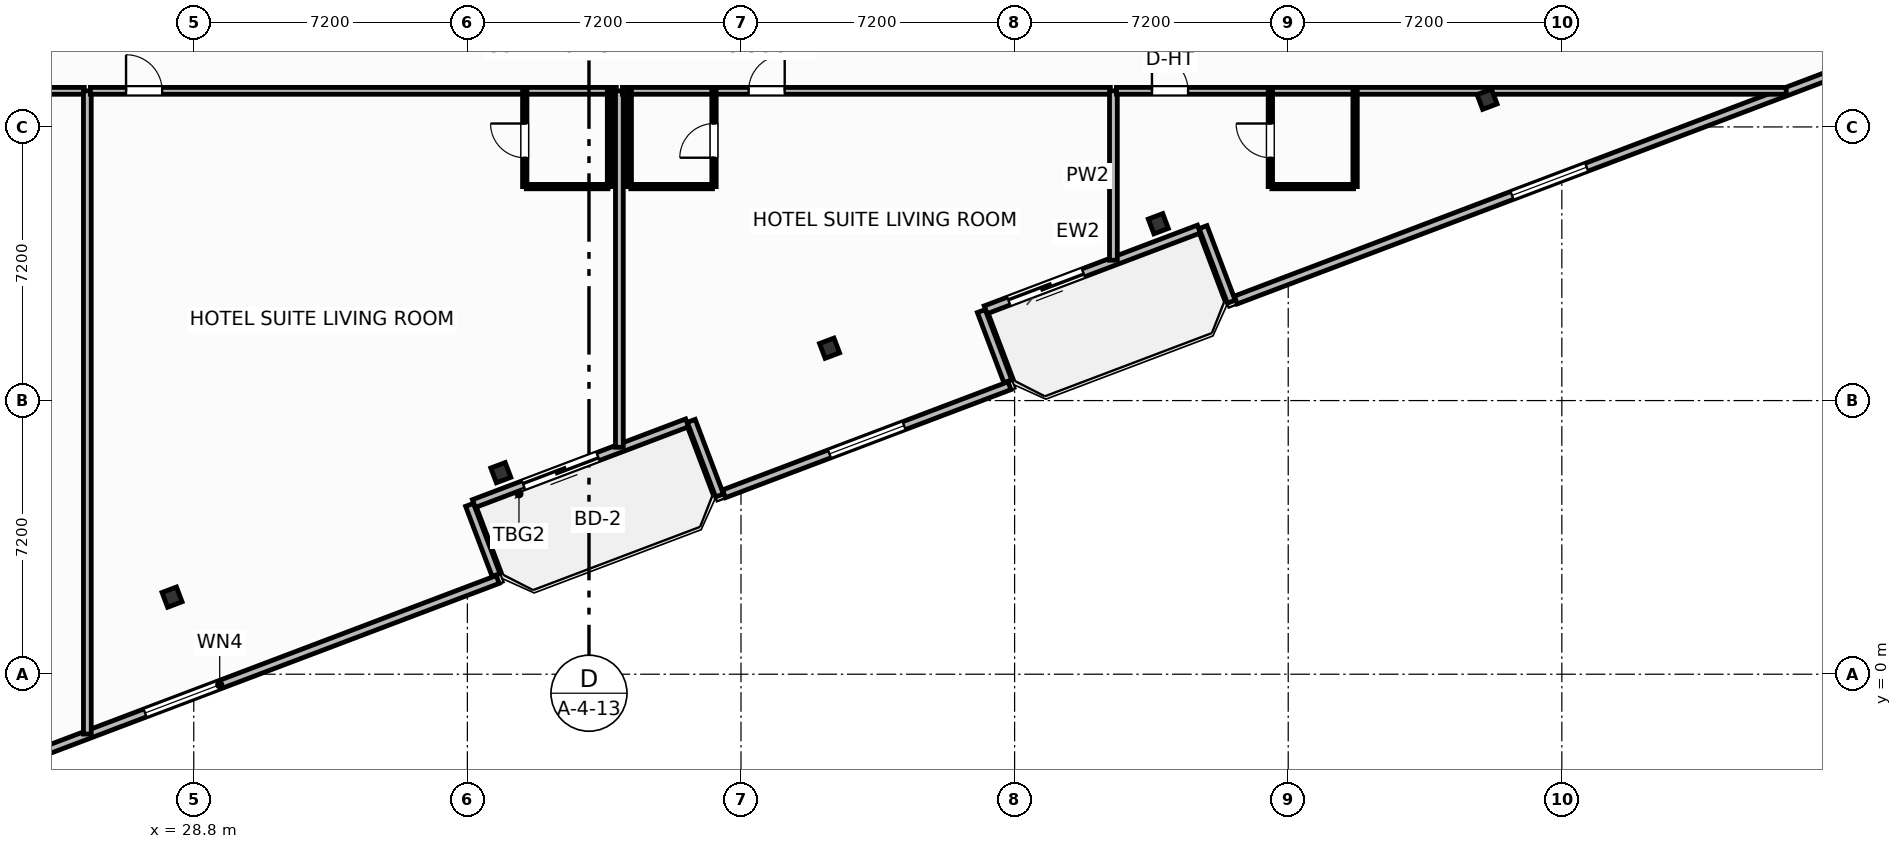
"""IFC4 building model, lengths in metres.
Left out: names, types, materials, properties, quantities, classifications, styles, units other than length and angle.
Written with IfcOpenShell. Run it as: python <this file> out.ifc"""

import sys

from ifc_helpers import new_model, si_unit, direction, frame, frame_2d, origin, origin_2d, place, context, subcontext, project, spatial, rectangle, i_section, extrude, element, fill, save


model = new_model("IFC4")
c1 = context("Model", 3, precision=1e-05, world=origin(), true_north=direction((0.0, 1.0)))
c2 = subcontext(c1, "Body", "Model", "MODEL_VIEW")
j1 = project(units=[si_unit("LENGTHUNIT", "METRE"), si_unit("PLANEANGLEUNIT", "RADIAN")], contexts=[c1])
p1 = place(None, origin())
s1 = spatial("IfcSite", under=j1, at=p1, CompositionType="ELEMENT")
p2 = place(p1, origin())
s2 = spatial("IfcBuilding", under=s1, at=p2, CompositionType="ELEMENT")
p3 = place(p2, frame((0.0, 0.0, 246.0)))
s3 = spatial("IfcBuildingStorey", under=s2, at=p3, CompositionType="ELEMENT", Elevation=246.0)
for number, where, z_axis, x_axis in (
    (1, (28.229, 2.028, 0.0), (0.0, 0.0, 1.0), (0.935, 0.354, 0.0)),
    (2, (36.88, 5.303, 0.0), (0.0, 0.0, 1.0), (0.935, 0.354, 0.0)),
    (3, (45.531, 8.578, 0.0), (0.0, 0.0, 1.0), (0.935, 0.354, 0.0)),
    (4, (54.181, 11.853, 0.0), (0.0, 0.0, 1.0), (0.935, 0.354, 0.0)),
    (5, (62.832, 15.128, 0.0), (0.0, 0.0, 1.0), (0.935, 0.354, 0.0)),
):
    element("IfcColumn", number, at=place(p3, frame(where, z_axis=z_axis, x_axis=x_axis)), inside=s3, PredefinedType="COLUMN", context=c2, shape_type="SweptSolid", body=[
        extrude(i_section(OverallWidth=0.406, OverallDepth=0.416, WebThickness=0.03, FlangeThickness=0.048, FilletRadius=0.025, at=origin_2d()), origin(), (0.0, 0.0, 1.0), 3.7),
    ])
p4 = place(p3, frame((41.783, 6.614, 0.0), z_axis=(0.0, 0.0, 1.0), x_axis=(-0.93521416643, -0.354082565101, 0.0)))
e6 = element("IfcWall", 6, at=p4, inside=s3, PredefinedType="SOLIDWALL", context=c2, shape_type="SweptSolid", body=[
    extrude(rectangle(XDim=6.0, YDim=0.22, at=frame_2d((3.0, 0.0))), origin(), (0.0, 0.0, 1.0), 2.73),
])
p5 = place(p4, frame((2.508, 0.0, 0.0)))
e7 = element("IfcOpeningElement", 7, at=p5, cuts=e6, PredefinedType="OPENING", context=c2, shape_type="SweptSolid", body=[
    extrude(rectangle(XDim=2.1, YDim=2.3, at=frame_2d((1.05, 1.15))), frame((0.0, 0.12, 0.0), z_axis=(0.0, -1.0, 0.0), x_axis=(1.0, 0.0, 0.0)), (0.0, 0.0, 1.0), 0.24),
])
p6 = place(p3, frame((55.25, 11.713, 0.0), z_axis=(0.0, 0.0, 1.0), x_axis=(-0.935227640088, -0.354046976001, 0.0)))
e8 = element("IfcWall", 8, at=p6, inside=s3, PredefinedType="SOLIDWALL", context=c2, shape_type="SweptSolid", body=[
    extrude(rectangle(XDim=6.0, YDim=0.22, at=frame_2d((3.0, 0.0))), origin(), (0.0, 0.0, 1.0), 2.73),
])
p7 = place(p6, frame((3.252, 0.0, 0.0)))
e9 = element("IfcOpeningElement", 9, at=p7, cuts=e8, PredefinedType="OPENING", context=c2, shape_type="SweptSolid", body=[
    extrude(rectangle(XDim=2.1, YDim=2.3, at=frame_2d((1.05, 1.15))), frame((0.0, 0.12, 0.0), z_axis=(0.0, -1.0, 0.0), x_axis=(1.0, 0.0, 0.0)), (0.0, 0.0, 1.0), 0.24),
])
p8 = place(p3, frame((20.202, -3.791, 0.0), z_axis=(0.0, 0.0, 1.0), x_axis=(0.935225574232, 0.354052432984, 0.0)))
e10 = element("IfcWall", 10, at=p8, inside=s3, PredefinedType="SOLIDWALL", context=c2, shape_type="SweptSolid", body=[
    extrude(rectangle(XDim=17.747, YDim=0.22, at=frame_2d((8.874, 0.0))), origin(), (0.0, 0.0, 1.0), 2.73),
])
p9 = place(p8, frame((7.823, 0.0, 0.8)))
e11 = element("IfcOpeningElement", 11, at=p9, cuts=e10, PredefinedType="OPENING", context=c2, shape_type="SweptSolid", body=[
    extrude(rectangle(XDim=2.1, YDim=1.75, at=frame_2d((1.05, 0.875))), frame((0.0, 0.12, 0.0), z_axis=(0.0, -1.0, 0.0), x_axis=(1.0, 0.0, 0.0)), (0.0, 0.0, 1.0), 0.24),
])
p10 = place(p3, frame((36.755, 2.61, 0.0), z_axis=(0.0, 0.0, 1.0), x_axis=(-0.354020680661, 0.935237594232, 0.0)))
e12 = element("IfcWall", 12, at=p10, inside=s3, PredefinedType="SOLIDWALL", context=c2, shape_type="SweptSolid", body=[
    extrude(rectangle(XDim=1.975, YDim=0.22, at=frame_2d((0.988, 0.0))), origin(), (0.0, 0.0, 1.0), 2.73),
])
p11 = place(p3, frame((41.892, 6.666, 0.0), z_axis=(0.0, 0.0, 1.0), x_axis=(0.354128469405, -0.935196785258, 0.0)))
e13 = element("IfcWall", 13, at=p11, inside=s3, PredefinedType="SOLIDWALL", context=c2, shape_type="SweptSolid", body=[
    extrude(rectangle(XDim=2.1, YDim=0.22, at=frame_2d((1.05, 0.0))), origin(), (0.0, 0.0, 1.0), 2.73),
])
p12 = place(p3, frame((42.752, 4.746, 0.0), z_axis=(0.0, 0.0, 1.0), x_axis=(0.935216926991, 0.354075273733, 0.0)))
e14 = element("IfcWall", 14, at=p12, inside=s3, PredefinedType="SOLIDWALL", context=c2, shape_type="SweptSolid", body=[
    extrude(rectangle(XDim=8.035, YDim=0.22, at=frame_2d((4.018, 0.0))), origin(), (0.0, 0.0, 1.0), 2.73),
])
p13 = place(p12, frame((2.968, 0.0, 0.8)))
e15 = element("IfcOpeningElement", 15, at=p13, cuts=e14, PredefinedType="OPENING", context=c2, shape_type="SweptSolid", body=[
    extrude(rectangle(XDim=2.1, YDim=1.75, at=frame_2d((1.05, 0.875))), frame((0.0, 0.12, 0.0), z_axis=(0.0, -1.0, 0.0), x_axis=(1.0, 0.0, 0.0)), (0.0, 0.0, 1.0), 0.24),
])
p14 = place(p3, frame((50.223, 7.708, 0.0), z_axis=(0.0, 0.0, 1.0), x_axis=(-0.354020680661, 0.935237594232, 0.0)))
e16 = element("IfcWall", 16, at=p14, inside=s3, PredefinedType="SOLIDWALL", context=c2, shape_type="SweptSolid", body=[
    extrude(rectangle(XDim=1.975, YDim=0.22, at=frame_2d((0.988, 0.0))), origin(), (0.0, 0.0, 1.0), 2.73),
])
p15 = place(p3, frame((55.359, 11.764, 0.0), z_axis=(0.0, 0.0, 1.0), x_axis=(0.354026782794, -0.935235284334, 0.0)))
e17 = element("IfcWall", 17, at=p15, inside=s3, PredefinedType="SOLIDWALL", context=c2, shape_type="SweptSolid", body=[
    extrude(rectangle(XDim=2.1, YDim=0.22, at=frame_2d((1.05, 0.0))), origin(), (0.0, 0.0, 1.0), 2.73),
])
p16 = place(p3, frame((56.219, 9.845, 0.0), z_axis=(0.0, 0.0, 1.0), x_axis=(0.935225601791, 0.354052360188, 0.0)))
e18 = element("IfcWall", 18, at=p16, inside=s3, PredefinedType="SOLIDWALL", context=c2, shape_type="SweptSolid", body=[
    extrude(rectangle(XDim=17.647, YDim=0.22, at=frame_2d((8.824, 0.0))), origin(), (0.0, 0.0, 1.0), 2.73),
])
p17 = place(p16, frame((7.774, 0.0, 0.8)))
e19 = element("IfcOpeningElement", 19, at=p17, cuts=e18, PredefinedType="OPENING", context=c2, shape_type="SweptSolid", body=[
    extrude(rectangle(XDim=2.1, YDim=1.75, at=frame_2d((1.05, 0.875))), frame((0.0, 0.12, 0.0), z_axis=(0.0, -1.0, 0.0), x_axis=(1.0, 0.0, 0.0)), (0.0, 0.0, 1.0), 0.24),
])
p18 = place(p3, frame((7.764, 15.35, 0.0), z_axis=(0.0, 0.0, 1.0), x_axis=(1.0, 0.0, 0.0)))
e20 = element("IfcWall", 20, at=p18, inside=s3, PredefinedType="PARTITIONING", context=c2, shape_type="SweptSolid", body=[
    extrude(rectangle(XDim=18.156, YDim=0.18, at=frame_2d((9.078, 0.0))), origin(), (0.0, 0.0, 1.0), 3.45),
])
p19 = place(p18, frame((14.007, 0.0, 0.0)))
e21 = element("IfcOpeningElement", 21, at=p19, cuts=e20, PredefinedType="OPENING", context=c2, shape_type="SweptSolid", body=[
    extrude(rectangle(XDim=0.95, YDim=2.15, at=frame_2d((0.475, 1.075))), frame((0.0, 0.1, 0.0), z_axis=(0.0, -1.0, 0.0), x_axis=(1.0, 0.0, 0.0)), (0.0, 0.0, 1.0), 0.2),
])
p20 = place(p3, frame((26.0, -1.574, 0.0), z_axis=(0.0, 0.0, 1.0), x_axis=(0.0, 1.0, 0.0)))
e22 = element("IfcWall", 22, at=p20, inside=s3, PredefinedType="PARTITIONING", context=c2, shape_type="SweptSolid", body=[
    extrude(rectangle(XDim=16.925, YDim=0.205, at=frame_2d((8.462, 0.0))), origin(), (0.0, 0.0, 1.0), 2.739),
])
p21 = place(p3, frame((26.08, 15.35, 0.0), z_axis=(0.0, 0.0, 1.0), x_axis=(1.0, 0.0, 0.0)))
e23 = element("IfcWall", 23, at=p21, inside=s3, PredefinedType="PARTITIONING", context=c2, shape_type="SweptSolid", body=[
    extrude(rectangle(XDim=13.84, YDim=0.18, at=frame_2d((6.92, 0.0))), origin(), (0.0, 0.0, 1.0), 3.45),
])
p22 = place(p21, frame((0.939, 0.0, 0.0)))
e24 = element("IfcOpeningElement", 24, at=p22, cuts=e23, PredefinedType="OPENING", context=c2, shape_type="SweptSolid", body=[
    extrude(rectangle(XDim=0.95, YDim=2.15, at=frame_2d((0.475, 1.075))), frame((0.0, 0.1, 0.0), z_axis=(0.0, -1.0, 0.0), x_axis=(1.0, 0.0, 0.0)), (0.0, 0.0, 1.0), 0.2),
])
p23 = place(p3, frame((37.55, 12.83, 0.0), z_axis=(0.0, 0.0, 1.0), x_axis=(1.0, 0.0, 0.0)))
e25 = element("IfcWall", 25, at=p23, inside=s3, PredefinedType="PARTITIONING", context=c2, shape_type="SweptSolid", body=[
    extrude(rectangle(XDim=2.15, YDim=0.115, at=frame_2d((1.075, 0.0))), origin(), (0.0, 0.0, 1.0), 3.45),
])
p24 = place(p3, frame((37.51, 12.83, 0.0), z_axis=(0.0, 0.0, 1.0), x_axis=(0.0, 1.0, 0.0)))
e26 = element("IfcWall", 26, at=p24, inside=s3, PredefinedType="PARTITIONING", context=c2, shape_type="SweptSolid", body=[
    extrude(rectangle(XDim=2.52, YDim=0.115, at=frame_2d((1.26, 0.0))), origin(), (0.0, 0.0, 1.0), 3.45),
])
p25 = place(p24, frame((0.76, 0.0, 0.0)))
e27 = element("IfcOpeningElement", 27, at=p25, cuts=e26, PredefinedType="OPENING", context=c2, shape_type="SweptSolid", body=[
    extrude(rectangle(XDim=0.9, YDim=2.05, at=frame_2d((0.45, 1.025))), frame((0.0, 0.067, 0.0), z_axis=(0.0, -1.0, 0.0), x_axis=(1.0, 0.0, 0.0)), (0.0, 0.0, 1.0), 0.135),
])
p26 = place(p3, frame((39.74, 12.83, 0.0), z_axis=(0.0, 0.0, 1.0), x_axis=(0.0, 1.0, 0.0)))
e28 = element("IfcWall", 28, at=p26, inside=s3, PredefinedType="PARTITIONING", context=c2, shape_type="SweptSolid", body=[
    extrude(rectangle(XDim=2.52, YDim=0.115, at=frame_2d((1.26, 0.0))), origin(), (0.0, 0.0, 1.0), 3.45),
])
p27 = place(p3, frame((40.0, 5.971, 0.0), z_axis=(0.0, 0.0, 1.0), x_axis=(0.0, 1.0, 0.0)))
e29 = element("IfcWall", 29, at=p27, inside=s3, PredefinedType="PARTITIONING", context=c2, shape_type="SweptSolid", body=[
    extrude(rectangle(XDim=9.379, YDim=0.205, at=frame_2d((4.689, 0.0))), origin(), (0.0, 0.0, 1.0), 3.45),
])
p28 = place(p3, frame((40.08, 15.35, 0.0), z_axis=(0.0, 0.0, 1.0), x_axis=(1.0, 0.0, 0.0)))
e30 = element("IfcWall", 30, at=p28, inside=s3, PredefinedType="PARTITIONING", context=c2, shape_type="SweptSolid", body=[
    extrude(rectangle(XDim=12.84, YDim=0.18, at=frame_2d((6.42, 0.0))), origin(), (0.0, 0.0, 1.0), 3.45),
])
p29 = place(p28, frame((3.321, 0.0, 0.0)))
e31 = element("IfcOpeningElement", 31, at=p29, cuts=e30, PredefinedType="OPENING", context=c2, shape_type="SweptSolid", body=[
    extrude(rectangle(XDim=0.95, YDim=2.15, at=frame_2d((0.475, 1.075))), frame((0.0, 0.1, 0.0), z_axis=(0.0, -1.0, 0.0), x_axis=(1.0, 0.0, 0.0)), (0.0, 0.0, 1.0), 0.2),
])
p30 = place(p3, frame((40.3, 12.83, 0.0), z_axis=(0.0, 0.0, 1.0), x_axis=(1.0, 0.0, 0.0)))
e32 = element("IfcWall", 32, at=p30, inside=s3, PredefinedType="PARTITIONING", context=c2, shape_type="SweptSolid", body=[
    extrude(rectangle(XDim=2.15, YDim=0.115, at=frame_2d((1.075, 0.0))), origin(), (0.0, 0.0, 1.0), 3.45),
])
p31 = place(p3, frame((42.49, 12.83, 0.0), z_axis=(0.0, 0.0, 1.0), x_axis=(0.0, 1.0, 0.0)))
e33 = element("IfcWall", 33, at=p31, inside=s3, PredefinedType="PARTITIONING", context=c2, shape_type="SweptSolid", body=[
    extrude(rectangle(XDim=2.52, YDim=0.115, at=frame_2d((1.26, 0.0))), origin(), (0.0, 0.0, 1.0), 3.45),
])
p32 = place(p31, frame((0.76, 0.0, 0.0)))
e34 = element("IfcOpeningElement", 34, at=p32, cuts=e33, PredefinedType="OPENING", context=c2, shape_type="SweptSolid", body=[
    extrude(rectangle(XDim=0.9, YDim=2.05, at=frame_2d((0.45, 1.025))), frame((0.0, 0.067, 0.0), z_axis=(0.0, -1.0, 0.0), x_axis=(1.0, 0.0, 0.0)), (0.0, 0.0, 1.0), 0.135),
])
p33 = place(p3, frame((40.26, 12.83, 0.0), z_axis=(0.0, 0.0, 1.0), x_axis=(0.0, 1.0, 0.0)))
e35 = element("IfcWall", 35, at=p33, inside=s3, PredefinedType="PARTITIONING", context=c2, shape_type="SweptSolid", body=[
    extrude(rectangle(XDim=2.52, YDim=0.115, at=frame_2d((1.26, 0.0))), origin(), (0.0, 0.0, 1.0), 3.45),
])
p34 = place(p3, frame((53.0, 10.893, 0.0), z_axis=(0.0, 0.0, 1.0), x_axis=(0.0, 1.0, 0.0)))
e36 = element("IfcWall", 36, at=p34, inside=s3, PredefinedType="PARTITIONING", context=c2, shape_type="SweptSolid", body=[
    extrude(rectangle(XDim=4.457, YDim=0.205, at=frame_2d((2.229, 0.0))), origin(), (0.0, 0.0, 1.0), 3.45),
])
p35 = place(p3, frame((53.08, 15.35, 0.0), z_axis=(0.0, 0.0, 1.0), x_axis=(1.0, 0.0, 0.0)))
e37 = element("IfcWall", 37, at=p35, inside=s3, PredefinedType="PARTITIONING", context=c2, shape_type="SweptSolid", body=[
    extrude(rectangle(XDim=17.624, YDim=0.18, at=frame_2d((8.812, 0.0))), origin(), (0.0, 0.0, 1.0), 3.45),
])
p36 = place(p35, frame((0.935, 0.0, 0.0)))
e38 = element("IfcOpeningElement", 38, at=p36, cuts=e37, PredefinedType="OPENING", context=c2, shape_type="SweptSolid", body=[
    extrude(rectangle(XDim=0.95, YDim=2.15, at=frame_2d((0.475, 1.075))), frame((0.0, 0.1, 0.0), z_axis=(0.0, -1.0, 0.0), x_axis=(1.0, 0.0, 0.0)), (0.0, 0.0, 1.0), 0.2),
])
p37 = place(p3, frame((57.17, 12.83, 0.0), z_axis=(0.0, 0.0, 1.0), x_axis=(1.0, 0.0, 0.0)))
e39 = element("IfcWall", 39, at=p37, inside=s3, PredefinedType="PARTITIONING", context=c2, shape_type="SweptSolid", body=[
    extrude(rectangle(XDim=2.15, YDim=0.115, at=frame_2d((1.075, 0.0))), origin(), (0.0, 0.0, 1.0), 3.45),
])
p38 = place(p3, frame((57.13, 12.83, 0.0), z_axis=(0.0, 0.0, 1.0), x_axis=(0.0, 1.0, 0.0)))
e40 = element("IfcWall", 40, at=p38, inside=s3, PredefinedType="PARTITIONING", context=c2, shape_type="SweptSolid", body=[
    extrude(rectangle(XDim=2.52, YDim=0.115, at=frame_2d((1.26, 0.0))), origin(), (0.0, 0.0, 1.0), 3.45),
])
p39 = place(p38, frame((0.76, 0.0, 0.0)))
e41 = element("IfcOpeningElement", 41, at=p39, cuts=e40, PredefinedType="OPENING", context=c2, shape_type="SweptSolid", body=[
    extrude(rectangle(XDim=0.9, YDim=2.05, at=frame_2d((0.45, 1.025))), frame((0.0, 0.067, 0.0), z_axis=(0.0, -1.0, 0.0), x_axis=(1.0, 0.0, 0.0)), (0.0, 0.0, 1.0), 0.135),
])
p40 = place(p3, frame((59.36, 12.83, 0.0), z_axis=(0.0, 0.0, 1.0), x_axis=(0.0, 1.0, 0.0)))
e42 = element("IfcWall", 42, at=p40, inside=s3, PredefinedType="PARTITIONING", context=c2, shape_type="SweptSolid", body=[
    extrude(rectangle(XDim=2.52, YDim=0.115, at=frame_2d((1.26, 0.0))), origin(), (0.0, 0.0, 1.0), 3.45),
])
p41 = place(p5, origin())
e43 = element("IfcDoor", 43, at=p41, inside=s3, OperationType="SLIDING_TO_LEFT", PredefinedType="DOOR", context=c2, shape_type="SweptSolid", body=[
    extrude(rectangle(XDim=2.1, YDim=2.3, at=frame_2d((1.05, 1.15))), frame((0.0, 0.025, 0.0), z_axis=(0.0, -1.0, 0.0), x_axis=(1.0, 0.0, 0.0)), (0.0, 0.0, 1.0), 0.05),
])
fill(e7, e43)
p42 = place(p7, origin())
e44 = element("IfcDoor", 44, at=p42, inside=s3, OperationType="SLIDING_TO_LEFT", PredefinedType="DOOR", context=c2, shape_type="SweptSolid", body=[
    extrude(rectangle(XDim=2.1, YDim=2.3, at=frame_2d((1.05, 1.15))), frame((0.0, 0.025, 0.0), z_axis=(0.0, -1.0, 0.0), x_axis=(1.0, 0.0, 0.0)), (0.0, 0.0, 1.0), 0.05),
])
fill(e9, e44)
p43 = place(p9, origin())
e45 = element("IfcWindow", 45, at=p43, inside=s3, PartitioningType="SINGLE_PANEL", PredefinedType="WINDOW", context=c2, shape_type="SweptSolid", body=[
    extrude(rectangle(XDim=2.1, YDim=1.75, at=frame_2d((1.05, 0.875))), frame((0.0, 0.03, 0.0), z_axis=(0.0, -1.0, 0.0), x_axis=(1.0, 0.0, 0.0)), (0.0, 0.0, 1.0), 0.06),
])
fill(e11, e45)
p44 = place(p13, origin())
e46 = element("IfcWindow", 46, at=p44, inside=s3, PartitioningType="SINGLE_PANEL", PredefinedType="WINDOW", context=c2, shape_type="SweptSolid", body=[
    extrude(rectangle(XDim=2.1, YDim=1.75, at=frame_2d((1.05, 0.875))), frame((0.0, 0.03, 0.0), z_axis=(0.0, -1.0, 0.0), x_axis=(1.0, 0.0, 0.0)), (0.0, 0.0, 1.0), 0.06),
])
fill(e15, e46)
p45 = place(p17, origin())
e47 = element("IfcWindow", 47, at=p45, inside=s3, PartitioningType="SINGLE_PANEL", PredefinedType="WINDOW", context=c2, shape_type="SweptSolid", body=[
    extrude(rectangle(XDim=2.1, YDim=1.75, at=frame_2d((1.05, 0.875))), frame((0.0, 0.03, 0.0), z_axis=(0.0, -1.0, 0.0), x_axis=(1.0, 0.0, 0.0)), (0.0, 0.0, 1.0), 0.06),
])
fill(e19, e47)
p46 = place(p22, origin())
e48 = element("IfcDoor", 48, at=p46, inside=s3, OperationType="SINGLE_SWING_LEFT", PredefinedType="DOOR", context=c2, shape_type="SweptSolid", body=[
    extrude(rectangle(XDim=0.95, YDim=2.15, at=frame_2d((0.475, 1.075))), frame((0.0, 0.025, 0.0), z_axis=(0.0, -1.0, 0.0), x_axis=(1.0, 0.0, 0.0)), (0.0, 0.0, 1.0), 0.05),
])
fill(e24, e48)
p47 = place(p25, origin())
e49 = element("IfcDoor", 49, at=p47, inside=s3, OperationType="SINGLE_SWING_RIGHT", PredefinedType="DOOR", context=c2, shape_type="SweptSolid", body=[
    extrude(rectangle(XDim=0.9, YDim=2.05, at=frame_2d((0.45, 1.025))), frame((0.0, 0.025, 0.0), z_axis=(0.0, -1.0, 0.0), x_axis=(1.0, 0.0, 0.0)), (0.0, 0.0, 1.0), 0.05),
])
fill(e27, e49)
p48 = place(p29, origin())
e50 = element("IfcDoor", 50, at=p48, inside=s3, OperationType="SINGLE_SWING_RIGHT", PredefinedType="DOOR", context=c2, shape_type="SweptSolid", body=[
    extrude(rectangle(XDim=0.95, YDim=2.15, at=frame_2d((0.475, 1.075))), frame((0.0, 0.025, 0.0), z_axis=(0.0, -1.0, 0.0), x_axis=(1.0, 0.0, 0.0)), (0.0, 0.0, 1.0), 0.05),
])
fill(e31, e50)
p49 = place(p32, origin())
e51 = element("IfcDoor", 51, at=p49, inside=s3, OperationType="SINGLE_SWING_LEFT", PredefinedType="DOOR", context=c2, shape_type="SweptSolid", body=[
    extrude(rectangle(XDim=0.9, YDim=2.05, at=frame_2d((0.45, 1.025))), frame((0.0, 0.025, 0.0), z_axis=(0.0, -1.0, 0.0), x_axis=(1.0, 0.0, 0.0)), (0.0, 0.0, 1.0), 0.05),
])
fill(e34, e51)
p50 = place(p36, origin())
e52 = element("IfcDoor", 52, at=p50, inside=s3, OperationType="SINGLE_SWING_LEFT", PredefinedType="DOOR", context=c2, shape_type="SweptSolid", body=[
    extrude(rectangle(XDim=0.95, YDim=2.15, at=frame_2d((0.475, 1.075))), frame((0.0, 0.025, 0.0), z_axis=(0.0, -1.0, 0.0), x_axis=(1.0, 0.0, 0.0)), (0.0, 0.0, 1.0), 0.05),
])
fill(e38, e52)
p51 = place(p39, origin())
e53 = element("IfcDoor", 53, at=p51, inside=s3, OperationType="SINGLE_SWING_RIGHT", PredefinedType="DOOR", context=c2, shape_type="SweptSolid", body=[
    extrude(rectangle(XDim=0.9, YDim=2.05, at=frame_2d((0.45, 1.025))), frame((0.0, 0.025, 0.0), z_axis=(0.0, -1.0, 0.0), x_axis=(1.0, 0.0, 0.0)), (0.0, 0.0, 1.0), 0.05),
])
fill(e41, e53)
save(model, sys.argv[1])
